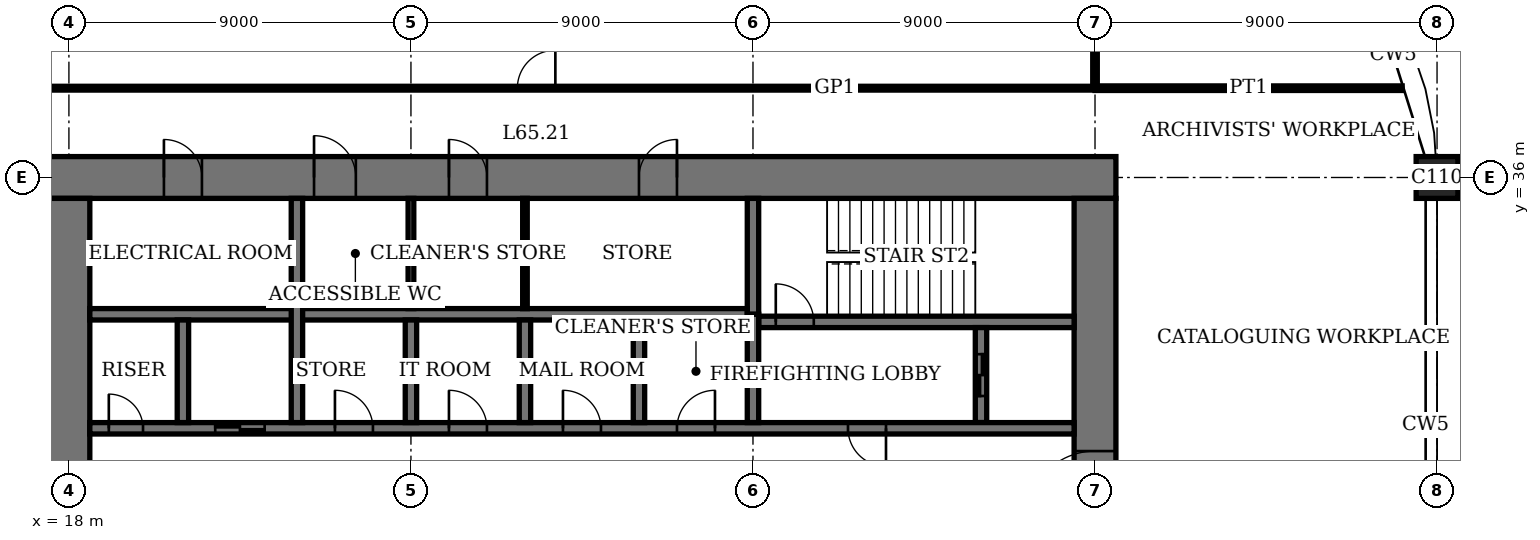
"""IFC4 building model, lengths in metres.
Left out: names, types, materials, properties, quantities, classifications, styles, units other than length and angle.
Written with IfcOpenShell. Run it as: python <this file> out.ifc"""

import sys

from ifc_helpers import new_model, si_unit, direction, frame, frame_2d, origin, origin_2d, place, context, subcontext, project, spatial, rectangle, extrude, element, fill, save


model = new_model("IFC4")
c1 = context("Model", 3, precision=1e-05, world=origin(), true_north=direction((0.0, 1.0)))
c2 = subcontext(c1, "Body", "Model", "MODEL_VIEW")
j1 = project(units=[si_unit("LENGTHUNIT", "METRE"), si_unit("PLANEANGLEUNIT", "RADIAN")], contexts=[c1])
p1 = place(None, origin())
s1 = spatial("IfcSite", under=j1, at=p1, CompositionType="ELEMENT")
p2 = place(p1, origin())
s2 = spatial("IfcBuilding", under=s1, at=p2, CompositionType="ELEMENT")
p3 = place(p2, frame((0.0, 0.0, 267.4)))
s3 = spatial("IfcBuildingStorey", under=s2, at=p3, CompositionType="ELEMENT", Elevation=267.4)
p4 = place(p3, frame((54.0, 36.0, 0.0), z_axis=(0.0, 0.0, 1.0), x_axis=(1.0, 0.0, 0.0)))
e1 = element("IfcColumn", 1, at=p4, inside=s3, PredefinedType="COLUMN", context=c2, shape_type="SweptSolid", body=[
    extrude(rectangle(XDim=1.1, YDim=1.1, at=origin_2d()), origin(), (0.0, 0.0, 1.0), 4.0),
])
p5 = place(p3, frame((45.55, 36.0, 0.0), z_axis=(0.0, 0.0, 1.0), x_axis=(-1.0, 0.0, 0.0)))
e2 = element("IfcWall", 2, at=p5, inside=s3, PredefinedType="SHEAR", context=c2, shape_type="SweptSolid", body=[
    extrude(rectangle(XDim=28.1, YDim=1.1, at=frame_2d((14.05, 0.0))), origin(), (0.0, 0.0, 1.0), 4.0),
])
p6 = place(p5, frame((11.55, 0.0, 0.0)))
e3 = element("IfcOpeningElement", 3, at=p6, cuts=e2, PredefinedType="OPENING", context=c2, shape_type="SweptSolid", body=[
    extrude(rectangle(XDim=1.0, YDim=2.4, at=frame_2d((0.5, 1.2))), frame((0.0, 0.56, 0.0), z_axis=(0.0, -1.0, 0.0), x_axis=(1.0, 0.0, 0.0)), (0.0, 0.0, 1.0), 1.12),
])
p7 = place(p5, frame((16.55, 0.0, 0.0)))
e4 = element("IfcOpeningElement", 4, at=p7, cuts=e2, PredefinedType="OPENING", context=c2, shape_type="SweptSolid", body=[
    extrude(rectangle(XDim=1.0, YDim=2.4, at=frame_2d((0.5, 1.2))), frame((0.0, 0.56, 0.0), z_axis=(0.0, -1.0, 0.0), x_axis=(1.0, 0.0, 0.0)), (0.0, 0.0, 1.0), 1.12),
])
p8 = place(p5, frame((20.0, 0.0, 0.0)))
e5 = element("IfcOpeningElement", 5, at=p8, cuts=e2, PredefinedType="OPENING", context=c2, shape_type="SweptSolid", body=[
    extrude(rectangle(XDim=1.1, YDim=2.4, at=frame_2d((0.55, 1.2))), frame((0.0, 0.56, 0.0), z_axis=(0.0, -1.0, 0.0), x_axis=(1.0, 0.0, 0.0)), (0.0, 0.0, 1.0), 1.12),
])
p9 = place(p5, frame((24.05, 0.0, 0.0)))
e6 = element("IfcOpeningElement", 6, at=p9, cuts=e2, PredefinedType="OPENING", context=c2, shape_type="SweptSolid", body=[
    extrude(rectangle(XDim=1.0, YDim=2.4, at=frame_2d((0.5, 1.2))), frame((0.0, 0.56, 0.0), z_axis=(0.0, -1.0, 0.0), x_axis=(1.0, 0.0, 0.0)), (0.0, 0.0, 1.0), 1.12),
])
p10 = place(p3, frame((18.0, 35.45, 0.0), z_axis=(0.0, 0.0, 1.0), x_axis=(0.0, -1.0, 0.0)))
e7 = element("IfcWall", 7, at=p10, inside=s3, PredefinedType="SHEAR", context=c2, shape_type="SweptSolid", body=[
    extrude(rectangle(XDim=16.9, YDim=1.1, at=frame_2d((8.45, 0.0))), origin(), (0.0, 0.0, 1.0), 4.0),
])
p11 = place(p10, frame((8.45, 0.0, 0.0)))
e8 = element("IfcOpeningElement", 8, at=p11, cuts=e7, PredefinedType="OPENING", context=c2, shape_type="SweptSolid", body=[
    extrude(rectangle(XDim=1.8, YDim=2.4, at=frame_2d((0.9, 1.2))), frame((0.0, 0.56, 0.0), z_axis=(0.0, -1.0, 0.0), x_axis=(1.0, 0.0, 0.0)), (0.0, 0.0, 1.0), 1.12),
])
p12 = place(p3, frame((45.0, 18.55, 0.0), z_axis=(0.0, 0.0, 1.0), x_axis=(0.0, 1.0, 0.0)))
e9 = element("IfcWall", 9, at=p12, inside=s3, PredefinedType="SHEAR", context=c2, shape_type="SweptSolid", body=[
    extrude(rectangle(XDim=16.9, YDim=1.1, at=frame_2d((8.45, 0.0))), origin(), (0.0, 0.0, 1.0), 4.0),
])
p13 = place(p12, frame((8.45, 0.0, 0.0)))
e10 = element("IfcOpeningElement", 10, at=p13, cuts=e9, PredefinedType="OPENING", context=c2, shape_type="SweptSolid", body=[
    extrude(rectangle(XDim=1.8, YDim=2.4, at=frame_2d((0.9, 1.2))), frame((0.0, 0.56, 0.0), z_axis=(0.0, -1.0, 0.0), x_axis=(1.0, 0.0, 0.0)), (0.0, 0.0, 1.0), 1.12),
])
p14 = place(p3, frame((36.15, 32.2, 0.0), z_axis=(0.0, 0.0, 1.0), x_axis=(1.0, 0.0, 0.0)))
e11 = element("IfcWall", 11, at=p14, inside=s3, PredefinedType="SHEAR", context=c2, shape_type="SweptSolid", body=[
    extrude(rectangle(XDim=8.3, YDim=0.3, at=frame_2d((4.15, 0.0))), origin(), (0.0, 0.0, 1.0), 4.0),
])
p15 = place(p14, frame((0.45, 0.0, 0.0)))
e12 = element("IfcOpeningElement", 12, at=p15, cuts=e11, PredefinedType="OPENING", context=c2, shape_type="SweptSolid", body=[
    extrude(rectangle(XDim=1.0, YDim=2.4, at=frame_2d((0.5, 1.2))), frame((0.0, 0.16, 0.0), z_axis=(0.0, -1.0, 0.0), x_axis=(1.0, 0.0, 0.0)), (0.0, 0.0, 1.0), 0.32),
])
p16 = place(p3, frame((36.0, 32.4, 0.0), z_axis=(0.0, 0.0, 1.0), x_axis=(0.0, 1.0, 0.0)))
e13 = element("IfcWall", 13, at=p16, inside=s3, PredefinedType="SHEAR", context=c2, shape_type="SweptSolid", body=[
    extrude(rectangle(XDim=3.05, YDim=0.3, at=frame_2d((1.525, 0.0))), origin(), (0.0, 0.0, 1.0), 4.0),
])
p17 = place(p3, frame((42.0, 29.55, 0.0), z_axis=(0.0, 0.0, 1.0), x_axis=(0.0, 1.0, 0.0)))
e14 = element("IfcWall", 14, at=p17, inside=s3, PredefinedType="SHEAR", context=c2, shape_type="SweptSolid", body=[
    extrude(rectangle(XDim=2.5, YDim=0.3, at=frame_2d((1.25, 0.0))), origin(), (0.0, 0.0, 1.0), 4.0),
])
p18 = place(p17, frame((0.7, 0.0, 0.0)))
e15 = element("IfcOpeningElement", 15, at=p18, cuts=e14, PredefinedType="OPENING", context=c2, shape_type="SweptSolid", body=[
    extrude(rectangle(XDim=1.1, YDim=2.4, at=frame_2d((0.55, 1.2))), frame((0.0, 0.16, 0.0), z_axis=(0.0, -1.0, 0.0), x_axis=(1.0, 0.0, 0.0)), (0.0, 0.0, 1.0), 0.32),
])
p19 = place(p3, frame((18.55, 29.4, 0.0), z_axis=(0.0, 0.0, 1.0), x_axis=(1.0, 0.0, 0.0)))
e16 = element("IfcWall", 16, at=p19, inside=s3, PredefinedType="SHEAR", context=c2, shape_type="SweptSolid", body=[
    extrude(rectangle(XDim=25.9, YDim=0.3, at=frame_2d((12.95, 0.0))), origin(), (0.0, 0.0, 1.0), 4.0),
])
p20 = place(p19, frame((19.95, 0.0, 0.0)))
e17 = element("IfcOpeningElement", 17, at=p20, cuts=e16, PredefinedType="OPENING", context=c2, shape_type="SweptSolid", body=[
    extrude(rectangle(XDim=1.0, YDim=2.4, at=frame_2d((0.5, 1.2))), frame((0.0, 0.16, 0.0), z_axis=(0.0, -1.0, 0.0), x_axis=(1.0, 0.0, 0.0)), (0.0, 0.0, 1.0), 0.32),
])
p21 = place(p19, frame((0.5, 0.0, 0.0)))
e18 = element("IfcOpeningElement", 18, at=p21, cuts=e16, PredefinedType="OPENING", context=c2, shape_type="SweptSolid", body=[
    extrude(rectangle(XDim=0.9, YDim=2.1, at=frame_2d((0.45, 1.05))), frame((0.0, 0.16, 0.0), z_axis=(0.0, -1.0, 0.0), x_axis=(1.0, 0.0, 0.0)), (0.0, 0.0, 1.0), 0.32),
])
p22 = place(p19, frame((15.45, 0.0, 0.0)))
e19 = element("IfcOpeningElement", 19, at=p22, cuts=e16, PredefinedType="OPENING", context=c2, shape_type="SweptSolid", body=[
    extrude(rectangle(XDim=1.0, YDim=2.4, at=frame_2d((0.5, 1.2))), frame((0.0, 0.16, 0.0), z_axis=(0.0, -1.0, 0.0), x_axis=(1.0, 0.0, 0.0)), (0.0, 0.0, 1.0), 0.32),
])
p23 = place(p19, frame((12.45, 0.0, 0.0)))
e20 = element("IfcOpeningElement", 20, at=p23, cuts=e16, PredefinedType="OPENING", context=c2, shape_type="SweptSolid", body=[
    extrude(rectangle(XDim=1.0, YDim=2.4, at=frame_2d((0.5, 1.2))), frame((0.0, 0.16, 0.0), z_axis=(0.0, -1.0, 0.0), x_axis=(1.0, 0.0, 0.0)), (0.0, 0.0, 1.0), 0.32),
])
p24 = place(p19, frame((9.45, 0.0, 0.0)))
e21 = element("IfcOpeningElement", 21, at=p24, cuts=e16, PredefinedType="OPENING", context=c2, shape_type="SweptSolid", body=[
    extrude(rectangle(XDim=1.0, YDim=2.4, at=frame_2d((0.5, 1.2))), frame((0.0, 0.16, 0.0), z_axis=(0.0, -1.0, 0.0), x_axis=(1.0, 0.0, 0.0)), (0.0, 0.0, 1.0), 0.32),
])
p25 = place(p19, frame((6.45, 0.0, 0.0)))
e22 = element("IfcOpeningElement", 22, at=p25, cuts=e16, PredefinedType="OPENING", context=c2, shape_type="SweptSolid", body=[
    extrude(rectangle(XDim=1.0, YDim=2.4, at=frame_2d((0.5, 1.2))), frame((0.0, 0.16, 0.0), z_axis=(0.0, -1.0, 0.0), x_axis=(1.0, 0.0, 0.0)), (0.0, 0.0, 1.0), 0.32),
])
p26 = place(p19, frame((3.3, 0.0, 0.0)))
e23 = element("IfcOpeningElement", 23, at=p26, cuts=e16, PredefinedType="OPENING", context=c2, shape_type="SweptSolid", body=[
    extrude(rectangle(XDim=1.3, YDim=2.4, at=frame_2d((0.65, 1.2))), frame((0.0, 0.16, 0.0), z_axis=(0.0, -1.0, 0.0), x_axis=(1.0, 0.0, 0.0)), (0.0, 0.0, 1.0), 0.32),
])
p27 = place(p3, frame((18.55, 32.4, 0.0), z_axis=(0.0, 0.0, 1.0), x_axis=(1.0, 0.0, 0.0)))
e24 = element("IfcWall", 24, at=p27, inside=s3, PredefinedType="SHEAR", context=c2, shape_type="SweptSolid", body=[
    extrude(rectangle(XDim=17.3, YDim=0.3, at=frame_2d((8.65, 0.0))), origin(), (0.0, 0.0, 1.0), 4.0),
])
for number, where, z_axis, x_axis in (
    (25, (33.0, 29.55, 0.0), (0.0, 0.0, 1.0), (0.0, 1.0, 0.0)),
    (26, (30.0, 29.55, 0.0), (0.0, 0.0, 1.0), (0.0, 1.0, 0.0)),
    (27, (27.0, 29.55, 0.0), (0.0, 0.0, 1.0), (0.0, 1.0, 0.0)),
):
    element("IfcWall", number, at=place(p3, frame(where, z_axis=z_axis, x_axis=x_axis)), inside=s3, PredefinedType="SHEAR", context=c2, shape_type="SweptSolid", body=[
        extrude(rectangle(XDim=2.7, YDim=0.3, at=frame_2d((1.35, 0.0))), origin(), (0.0, 0.0, 1.0), 4.0),
    ])
p28 = place(p3, frame((24.0, 29.55, 0.0), z_axis=(0.0, 0.0, 1.0), x_axis=(0.0, 1.0, 0.0)))
e28 = element("IfcWall", 28, at=p28, inside=s3, PredefinedType="SHEAR", context=c2, shape_type="SweptSolid", body=[
    extrude(rectangle(XDim=5.9, YDim=0.3, at=frame_2d((2.95, 0.0))), origin(), (0.0, 0.0, 1.0), 4.0),
])
p29 = place(p3, frame((21.0, 29.55, 0.0), z_axis=(0.0, 0.0, 1.0), x_axis=(0.0, 1.0, 0.0)))
e29 = element("IfcWall", 29, at=p29, inside=s3, PredefinedType="SHEAR", context=c2, shape_type="SweptSolid", body=[
    extrude(rectangle(XDim=2.7, YDim=0.3, at=frame_2d((1.35, 0.0))), origin(), (0.0, 0.0, 1.0), 4.0),
])
p30 = place(p3, frame((36.0, 29.55, 0.0), z_axis=(0.0, 0.0, 1.0), x_axis=(0.0, 1.0, 0.0)))
e30 = element("IfcWall", 30, at=p30, inside=s3, PredefinedType="SHEAR", context=c2, shape_type="SweptSolid", body=[
    extrude(rectangle(XDim=2.85, YDim=0.3, at=frame_2d((1.425, 0.0))), origin(), (0.0, 0.0, 1.0), 4.0),
])
p31 = place(p3, frame((45.0, 38.35, 0.0), z_axis=(0.0, 0.0, 1.0), x_axis=(1.0, 0.0, 0.0)))
e31 = element("IfcWall", 31, at=p31, inside=s3, PredefinedType="PARTITIONING", context=c2, shape_type="SweptSolid", body=[
    extrude(rectangle(XDim=8.082, YDim=0.12, at=frame_2d((4.041, 0.0))), origin(), (0.0, 0.0, 1.0), 3.75),
])
p32 = place(p3, frame((15.6, 38.35, 0.0), z_axis=(0.0, 0.0, 1.0), x_axis=(1.0, 0.0, 0.0)))
e32 = element("IfcWall", 32, at=p32, inside=s3, PredefinedType="PARTITIONING", context=c2, shape_type="SweptSolid", body=[
    extrude(rectangle(XDim=29.4, YDim=0.1, at=frame_2d((14.7, 0.0))), origin(), (0.0, 0.0, 1.0), 3.75),
])
p33 = place(p32, frame((14.2, 0.0, 0.0)))
e33 = element("IfcOpeningElement", 33, at=p33, cuts=e32, PredefinedType="OPENING", context=c2, shape_type="SweptSolid", body=[
    extrude(rectangle(XDim=1.0, YDim=2.4, at=frame_2d((0.5, 1.2))), frame((0.0, 0.06, 0.0), z_axis=(0.0, -1.0, 0.0), x_axis=(1.0, 0.0, 0.0)), (0.0, 0.0, 1.0), 0.12),
])
p34 = place(p3, frame((45.0, 38.35, 0.0), z_axis=(0.0, 0.0, 1.0), x_axis=(0.0, 1.0, 0.0)))
e34 = element("IfcWall", 34, at=p34, inside=s3, PredefinedType="PARTITIONING", context=c2, shape_type="SweptSolid", body=[
    extrude(rectangle(XDim=6.1, YDim=0.12, at=frame_2d((3.05, 0.0))), origin(), (0.0, 0.0, 1.0), 3.05),
])
p35 = place(p34, frame((3.325, 0.0, 0.0)))
e35 = element("IfcOpeningElement", 35, at=p35, cuts=e34, PredefinedType="OPENING", context=c2, shape_type="SweptSolid", body=[
    extrude(rectangle(XDim=1.0, YDim=2.4, at=frame_2d((0.5, 1.2))), frame((0.0, 0.07, 0.0), z_axis=(0.0, -1.0, 0.0), x_axis=(1.0, 0.0, 0.0)), (0.0, 0.0, 1.0), 0.14),
])
p36 = place(p3, frame((30.0, 32.55, 0.0), z_axis=(0.0, 0.0, 1.0), x_axis=(0.0, 1.0, 0.0)))
e36 = element("IfcWall", 36, at=p36, inside=s3, PredefinedType="PARTITIONING", context=c2, shape_type="SweptSolid", body=[
    extrude(rectangle(XDim=2.9, YDim=0.12, at=frame_2d((1.45, 0.0))), origin(), (0.0, 0.0, 1.0), 3.75),
])
p37 = place(p3, frame((27.0, 32.55, 0.0), z_axis=(0.0, 0.0, 1.0), x_axis=(0.0, 1.0, 0.0)))
e37 = element("IfcWall", 37, at=p37, inside=s3, PredefinedType="PARTITIONING", context=c2, shape_type="SweptSolid", body=[
    extrude(rectangle(XDim=2.9, YDim=0.15, at=frame_2d((1.45, 0.0))), origin(), (0.0, 0.0, 1.0), 3.75),
])
p38 = place(p13, origin())
e38 = element("IfcDoor", 38, at=p38, inside=s3, OperationType="DOUBLE_DOOR_DOUBLE_SWING", PredefinedType="DOOR", context=c2, shape_type="SweptSolid", body=[
    extrude(rectangle(XDim=1.8, YDim=2.4, at=frame_2d((0.9, 1.2))), frame((0.0, 0.03, 0.0), z_axis=(0.0, -1.0, 0.0), x_axis=(1.0, 0.0, 0.0)), (0.0, 0.0, 1.0), 0.06),
    extrude(rectangle(XDim=0.04, YDim=2.4, at=frame_2d((0.02, 1.2))), frame((0.0, 0.55, 0.0), z_axis=(0.0, -1.0, 0.0), x_axis=(1.0, 0.0, 0.0)), (0.0, 0.0, 1.0), 1.1),
    extrude(rectangle(XDim=0.04, YDim=2.4, at=frame_2d((1.78, 1.2))), frame((0.0, 0.55, 0.0), z_axis=(0.0, -1.0, 0.0), x_axis=(1.0, 0.0, 0.0)), (0.0, 0.0, 1.0), 1.1),
    extrude(rectangle(XDim=1.8, YDim=0.04, at=frame_2d((0.9, 2.38))), frame((0.0, 0.55, 0.0), z_axis=(0.0, -1.0, 0.0), x_axis=(1.0, 0.0, 0.0)), (0.0, 0.0, 1.0), 1.1),
])
fill(e10, e38)
p39 = place(p6, origin())
e39 = element("IfcDoor", 39, at=p39, inside=s3, OperationType="SINGLE_SWING_LEFT", PredefinedType="DOOR", context=c2, shape_type="SweptSolid", body=[
    extrude(rectangle(XDim=1.0, YDim=2.4, at=frame_2d((0.5, 1.2))), frame((0.0, 0.025, 0.0), z_axis=(0.0, -1.0, 0.0), x_axis=(1.0, 0.0, 0.0)), (0.0, 0.0, 1.0), 0.05),
    extrude(rectangle(XDim=0.04, YDim=2.4, at=frame_2d((0.02, 1.2))), frame((0.0, 0.4, 0.0), z_axis=(0.0, -1.0, 0.0), x_axis=(1.0, 0.0, 0.0)), (0.0, 0.0, 1.0), 0.8),
    extrude(rectangle(XDim=0.04, YDim=2.4, at=frame_2d((0.98, 1.2))), frame((0.0, 0.4, 0.0), z_axis=(0.0, -1.0, 0.0), x_axis=(1.0, 0.0, 0.0)), (0.0, 0.0, 1.0), 0.8),
    extrude(rectangle(XDim=1.0, YDim=0.04, at=frame_2d((0.5, 2.38))), frame((0.0, 0.4, 0.0), z_axis=(0.0, -1.0, 0.0), x_axis=(1.0, 0.0, 0.0)), (0.0, 0.0, 1.0), 0.8),
])
fill(e3, e39)
p40 = place(p7, origin())
e40 = element("IfcDoor", 40, at=p40, inside=s3, OperationType="SINGLE_SWING_RIGHT", PredefinedType="DOOR", context=c2, shape_type="SweptSolid", body=[
    extrude(rectangle(XDim=1.0, YDim=2.4, at=frame_2d((0.5, 1.2))), frame((0.0, 0.025, 0.0), z_axis=(0.0, -1.0, 0.0), x_axis=(1.0, 0.0, 0.0)), (0.0, 0.0, 1.0), 0.05),
    extrude(rectangle(XDim=0.04, YDim=2.4, at=frame_2d((0.02, 1.2))), frame((0.0, 0.4, 0.0), z_axis=(0.0, -1.0, 0.0), x_axis=(1.0, 0.0, 0.0)), (0.0, 0.0, 1.0), 0.8),
    extrude(rectangle(XDim=0.04, YDim=2.4, at=frame_2d((0.98, 1.2))), frame((0.0, 0.4, 0.0), z_axis=(0.0, -1.0, 0.0), x_axis=(1.0, 0.0, 0.0)), (0.0, 0.0, 1.0), 0.8),
    extrude(rectangle(XDim=1.0, YDim=0.04, at=frame_2d((0.5, 2.38))), frame((0.0, 0.4, 0.0), z_axis=(0.0, -1.0, 0.0), x_axis=(1.0, 0.0, 0.0)), (0.0, 0.0, 1.0), 0.8),
])
fill(e4, e40)
p41 = place(p8, origin())
e41 = element("IfcDoor", 41, at=p41, inside=s3, OperationType="SINGLE_SWING_RIGHT", PredefinedType="DOOR", context=c2, shape_type="SweptSolid", body=[
    extrude(rectangle(XDim=1.1, YDim=2.4, at=frame_2d((0.55, 1.2))), frame((0.0, 0.025, 0.0), z_axis=(0.0, -1.0, 0.0), x_axis=(1.0, 0.0, 0.0)), (0.0, 0.0, 1.0), 0.05),
    extrude(rectangle(XDim=0.04, YDim=2.4, at=frame_2d((0.02, 1.2))), frame((0.0, 0.44, 0.0), z_axis=(0.0, -1.0, 0.0), x_axis=(1.0, 0.0, 0.0)), (0.0, 0.0, 1.0), 0.88),
    extrude(rectangle(XDim=0.04, YDim=2.4, at=frame_2d((1.08, 1.2))), frame((0.0, 0.44, 0.0), z_axis=(0.0, -1.0, 0.0), x_axis=(1.0, 0.0, 0.0)), (0.0, 0.0, 1.0), 0.88),
    extrude(rectangle(XDim=1.1, YDim=0.04, at=frame_2d((0.55, 2.38))), frame((0.0, 0.44, 0.0), z_axis=(0.0, -1.0, 0.0), x_axis=(1.0, 0.0, 0.0)), (0.0, 0.0, 1.0), 0.88),
])
fill(e5, e41)
p42 = place(p9, origin())
e42 = element("IfcDoor", 42, at=p42, inside=s3, OperationType="SINGLE_SWING_RIGHT", PredefinedType="DOOR", context=c2, shape_type="SweptSolid", body=[
    extrude(rectangle(XDim=1.0, YDim=2.4, at=frame_2d((0.5, 1.2))), frame((0.0, 0.025, 0.0), z_axis=(0.0, -1.0, 0.0), x_axis=(1.0, 0.0, 0.0)), (0.0, 0.0, 1.0), 0.05),
    extrude(rectangle(XDim=0.04, YDim=2.4, at=frame_2d((0.02, 1.2))), frame((0.0, 0.4, 0.0), z_axis=(0.0, -1.0, 0.0), x_axis=(1.0, 0.0, 0.0)), (0.0, 0.0, 1.0), 0.8),
    extrude(rectangle(XDim=0.04, YDim=2.4, at=frame_2d((0.98, 1.2))), frame((0.0, 0.4, 0.0), z_axis=(0.0, -1.0, 0.0), x_axis=(1.0, 0.0, 0.0)), (0.0, 0.0, 1.0), 0.8),
    extrude(rectangle(XDim=1.0, YDim=0.04, at=frame_2d((0.5, 2.38))), frame((0.0, 0.4, 0.0), z_axis=(0.0, -1.0, 0.0), x_axis=(1.0, 0.0, 0.0)), (0.0, 0.0, 1.0), 0.8),
])
fill(e6, e42)
p43 = place(p15, origin())
e43 = element("IfcDoor", 43, at=p43, inside=s3, OperationType="SINGLE_SWING_RIGHT", PredefinedType="DOOR", context=c2, shape_type="SweptSolid", body=[
    extrude(rectangle(XDim=1.0, YDim=2.4, at=frame_2d((0.5, 1.2))), frame((0.0, 0.03, 0.0), z_axis=(0.0, -1.0, 0.0), x_axis=(1.0, 0.0, 0.0)), (0.0, 0.0, 1.0), 0.06),
])
fill(e12, e43)
p44 = place(p20, origin())
e44 = element("IfcDoor", 44, at=p44, inside=s3, OperationType="SINGLE_SWING_RIGHT", PredefinedType="DOOR", context=c2, shape_type="SweptSolid", body=[
    extrude(rectangle(XDim=1.0, YDim=2.4, at=frame_2d((0.5, 1.2))), frame((0.0, 0.03, 0.0), z_axis=(0.0, -1.0, 0.0), x_axis=(1.0, 0.0, 0.0)), (0.0, 0.0, 1.0), 0.06),
])
fill(e17, e44)
p45 = place(p21, origin())
e45 = element("IfcDoor", 45, at=p45, inside=s3, OperationType="SINGLE_SWING_RIGHT", PredefinedType="DOOR", context=c2, shape_type="SweptSolid", body=[
    extrude(rectangle(XDim=0.9, YDim=2.1, at=frame_2d((0.45, 1.05))), frame((0.0, 0.03, 0.0), z_axis=(0.0, -1.0, 0.0), x_axis=(1.0, 0.0, 0.0)), (0.0, 0.0, 1.0), 0.06),
])
fill(e18, e45)
p46 = place(p33, origin())
e46 = element("IfcDoor", 46, at=p46, inside=s3, OperationType="SINGLE_SWING_LEFT", PredefinedType="DOOR", context=c2, shape_type="SweptSolid", body=[
    extrude(rectangle(XDim=1.0, YDim=2.4, at=frame_2d((0.5, 1.2))), frame((0.0, 0.02, 0.0), z_axis=(0.0, -1.0, 0.0), x_axis=(1.0, 0.0, 0.0)), (0.0, 0.0, 1.0), 0.04),
])
fill(e33, e46)
p47 = place(p22, origin())
e47 = element("IfcDoor", 47, at=p47, inside=s3, OperationType="SINGLE_SWING_LEFT", PredefinedType="DOOR", context=c2, shape_type="SweptSolid", body=[
    extrude(rectangle(XDim=1.0, YDim=2.4, at=frame_2d((0.5, 1.2))), frame((0.0, 0.03, 0.0), z_axis=(0.0, -1.0, 0.0), x_axis=(1.0, 0.0, 0.0)), (0.0, 0.0, 1.0), 0.06),
])
fill(e19, e47)
p48 = place(p23, origin())
e48 = element("IfcDoor", 48, at=p48, inside=s3, OperationType="SINGLE_SWING_RIGHT", PredefinedType="DOOR", context=c2, shape_type="SweptSolid", body=[
    extrude(rectangle(XDim=1.0, YDim=2.4, at=frame_2d((0.5, 1.2))), frame((0.0, 0.03, 0.0), z_axis=(0.0, -1.0, 0.0), x_axis=(1.0, 0.0, 0.0)), (0.0, 0.0, 1.0), 0.06),
])
fill(e20, e48)
p49 = place(p24, origin())
e49 = element("IfcDoor", 49, at=p49, inside=s3, OperationType="SINGLE_SWING_RIGHT", PredefinedType="DOOR", context=c2, shape_type="SweptSolid", body=[
    extrude(rectangle(XDim=1.0, YDim=2.4, at=frame_2d((0.5, 1.2))), frame((0.0, 0.03, 0.0), z_axis=(0.0, -1.0, 0.0), x_axis=(1.0, 0.0, 0.0)), (0.0, 0.0, 1.0), 0.06),
])
fill(e21, e49)
p50 = place(p25, origin())
e50 = element("IfcDoor", 50, at=p50, inside=s3, OperationType="SINGLE_SWING_RIGHT", PredefinedType="DOOR", context=c2, shape_type="SweptSolid", body=[
    extrude(rectangle(XDim=1.0, YDim=2.4, at=frame_2d((0.5, 1.2))), frame((0.0, 0.03, 0.0), z_axis=(0.0, -1.0, 0.0), x_axis=(1.0, 0.0, 0.0)), (0.0, 0.0, 1.0), 0.06),
])
fill(e22, e50)
p51 = place(p26, origin())
e51 = element("IfcDoor", 51, at=p51, inside=s3, OperationType="DOUBLE_DOOR_SLIDING", PredefinedType="DOOR", context=c2, shape_type="SweptSolid", body=[
    extrude(rectangle(XDim=1.3, YDim=2.4, at=frame_2d((0.65, 1.2))), frame((0.0, 0.02, 0.0), z_axis=(0.0, -1.0, 0.0), x_axis=(1.0, 0.0, 0.0)), (0.0, 0.0, 1.0), 0.04),
])
fill(e23, e51)
p52 = place(p18, origin())
e52 = element("IfcDoor", 52, at=p52, inside=s3, OperationType="DOUBLE_DOOR_SLIDING", PredefinedType="DOOR", context=c2, shape_type="SweptSolid", body=[
    extrude(rectangle(XDim=1.1, YDim=2.4, at=frame_2d((0.55, 1.2))), frame((0.0, 0.03, 0.0), z_axis=(0.0, -1.0, 0.0), x_axis=(1.0, 0.0, 0.0)), (0.0, 0.0, 1.0), 0.06),
])
fill(e15, e52)
save(model, sys.argv[1])
